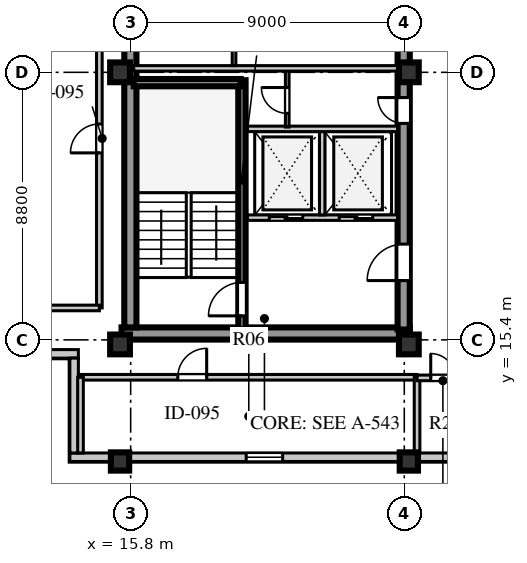
"""IFC4 building model, lengths in metres.
Left out: names, types, materials, properties, quantities, classifications, styles, units other than length and angle.
Written with IfcOpenShell. Run it as: python <this file> out.ifc"""

import sys

from ifc_helpers import new_model, si_unit, direction, frame, frame_2d, origin, origin_2d, place, context, subcontext, project, spatial, rectangle, extrude, element, fill, save


model = new_model("IFC4")
c1 = context("Model", 3, precision=1e-05, world=origin(), true_north=direction((0.0, 1.0)))
c2 = subcontext(c1, "Body", "Model", "MODEL_VIEW")
j1 = project(units=[si_unit("LENGTHUNIT", "METRE"), si_unit("PLANEANGLEUNIT", "RADIAN")], contexts=[c1])
p1 = place(None, origin())
s1 = spatial("IfcSite", under=j1, at=p1, CompositionType="ELEMENT")
p2 = place(p1, origin())
s2 = spatial("IfcBuilding", under=s1, at=p2, CompositionType="ELEMENT")
p3 = place(p2, frame((0.0, 0.0, 335.3)))
s3 = spatial("IfcBuildingStorey", under=s2, at=p3, CompositionType="ELEMENT", Elevation=335.3)
p4 = place(p3, frame((15.5, 15.61, 0.0), z_axis=(0.0, 0.0, 1.0), x_axis=(1.0, 0.0, 0.0)))
e1 = element("IfcWall", 1, at=p4, inside=s3, PredefinedType="SHEAR", context=c2, shape_type="SweptSolid", body=[
    extrude(rectangle(XDim=9.48, YDim=0.4, at=frame_2d((4.74, 0.0))), origin(), (0.0, 0.0, 1.0), 3.56),
])
p5 = place(p3, frame((15.79, 15.81, 0.0), z_axis=(0.0, 0.0, 1.0), x_axis=(0.0, 1.0, 0.0)))
e2 = element("IfcWall", 2, at=p5, inside=s3, PredefinedType="SHEAR", context=c2, shape_type="SweptSolid", body=[
    extrude(rectangle(XDim=25.63, YDim=0.4, at=frame_2d((12.815, 0.0))), origin(), (0.0, 0.0, 1.0), 3.56),
])
p6 = place(p3, frame((24.78, 15.74, 0.0), z_axis=(0.0, 0.0, 1.0), x_axis=(0.0, 1.0, 0.0)))
e3 = element("IfcWall", 3, at=p6, inside=s3, PredefinedType="SHEAR", context=c2, shape_type="SweptSolid", body=[
    extrude(rectangle(XDim=25.76, YDim=0.4, at=frame_2d((12.88, 0.0))), origin(), (0.0, 0.0, 1.0), 3.56),
])
p7 = place(p6, frame((1.61, 0.0, 0.0)))
e4 = element("IfcOpeningElement", 4, at=p7, cuts=e3, PredefinedType="OPENING", context=c2, shape_type="SweptSolid", body=[
    extrude(rectangle(XDim=1.2, YDim=2.1, at=frame_2d((0.6, 1.05))), frame((0.0, 0.21, 0.0), z_axis=(0.0, -1.0, 0.0), x_axis=(1.0, 0.0, 0.0)), (0.0, 0.0, 1.0), 0.42),
])
p8 = place(p6, frame((6.78, 0.0, 0.0)))
e5 = element("IfcOpeningElement", 5, at=p8, cuts=e3, PredefinedType="OPENING", context=c2, shape_type="SweptSolid", body=[
    extrude(rectangle(XDim=0.85, YDim=2.06, at=frame_2d((0.425, 1.03))), frame((0.0, 0.21, 0.0), z_axis=(0.0, -1.0, 0.0), x_axis=(1.0, 0.0, 0.0)), (0.0, 0.0, 1.0), 0.42),
])
p9 = place(p6, frame((12.11, 0.0, 0.0)))
e6 = element("IfcOpeningElement", 6, at=p9, cuts=e3, PredefinedType="OPENING", context=c2, shape_type="SweptSolid", body=[
    extrude(rectangle(XDim=1.5, YDim=2.12, at=frame_2d((0.75, 1.06))), frame((0.0, 0.21, 0.0), z_axis=(0.0, -1.0, 0.0), x_axis=(1.0, 0.0, 0.0)), (0.0, 0.0, 1.0), 0.42),
])
p10 = place(p6, frame((20.11, 0.0, 0.0)))
e7 = element("IfcOpeningElement", 7, at=p10, cuts=e3, PredefinedType="OPENING", context=c2, shape_type="SweptSolid", body=[
    extrude(rectangle(XDim=1.2, YDim=2.12, at=frame_2d((0.6, 1.06))), frame((0.0, 0.21, 0.0), z_axis=(0.0, -1.0, 0.0), x_axis=(1.0, 0.0, 0.0)), (0.0, 0.0, 1.0), 0.42),
])
p11 = place(p6, frame((24.01, 0.0, 0.0)))
e8 = element("IfcOpeningElement", 8, at=p11, cuts=e3, PredefinedType="OPENING", context=c2, shape_type="SweptSolid", body=[
    extrude(rectangle(XDim=0.95, YDim=2.1, at=frame_2d((0.475, 1.05))), frame((0.0, 0.21, 0.0), z_axis=(0.0, -1.0, 0.0), x_axis=(1.0, 0.0, 0.0)), (0.0, 0.0, 1.0), 0.42),
])
for number, where, z_axis, x_axis in (
    (9, (15.45, 15.25, 0.0), (0.0, 0.0, 1.0), (1.0, 0.0, 0.0)),
    (10, (15.45, 24.2, 0.0), (0.0, 0.0, 1.0), (1.0, 0.0, 0.0)),
    (11, (24.95, 15.25, 0.0), (0.0, 0.0, 1.0), (1.0, 0.0, 0.0)),
    (12, (24.95, 24.2, 0.0), (0.0, 0.0, 1.0), (1.0, 0.0, 0.0)),
):
    element("IfcColumn", number, at=place(p3, frame(where, z_axis=z_axis, x_axis=x_axis)), inside=s3, PredefinedType="COLUMN", context=c2, shape_type="SweptSolid", body=[
        extrude(rectangle(XDim=0.65, YDim=0.65, at=origin_2d()), origin(), (0.0, 0.0, 1.0), 3.56),
    ])
for number, where, z_axis, x_axis in (
    (13, (15.45, 11.4, 0.0), (0.0, 0.0, 1.0), (1.0, 0.0, 0.0)),
    (14, (24.95, 11.4, 0.0), (0.0, 0.0, 1.0), (1.0, 0.0, 0.0)),
):
    element("IfcColumn", number, at=place(p3, frame(where, z_axis=z_axis, x_axis=x_axis)), inside=s3, PredefinedType="COLUMN", context=c2, shape_type="SweptSolid", body=[
        extrude(rectangle(XDim=0.6, YDim=0.6, at=origin_2d()), origin(), (0.0, 0.0, 1.0), 3.56),
    ])
p12 = place(p3, frame((13.8, 11.54, 0.0), z_axis=(0.0, 0.0, 1.0), x_axis=(1.0, 0.0, 0.0)))
e15 = element("IfcWall", 15, at=p12, inside=s3, PredefinedType="STANDARD", context=c2, shape_type="SweptSolid", body=[
    extrude(rectangle(XDim=26.0, YDim=0.28, at=frame_2d((13.0, 0.0))), origin(), (0.0, 0.0, 1.0), 2.92),
])
p13 = place(p12, frame((5.8, 0.0, 0.8)))
e16 = element("IfcOpeningElement", 16, at=p13, cuts=e15, PredefinedType="OPENING", context=c2, shape_type="SweptSolid", body=[
    extrude(rectangle(XDim=1.2, YDim=1.75, at=frame_2d((0.6, 0.875))), frame((0.0, 0.15, 0.0), z_axis=(0.0, -1.0, 0.0), x_axis=(1.0, 0.0, 0.0)), (0.0, 0.0, 1.0), 0.3),
])
p14 = place(p12, frame((14.18, 0.0, 0.8)))
e17 = element("IfcOpeningElement", 17, at=p14, cuts=e15, PredefinedType="OPENING", context=c2, shape_type="SweptSolid", body=[
    extrude(rectangle(XDim=1.2, YDim=1.75, at=frame_2d((0.6, 0.875))), frame((0.0, 0.15, 0.0), z_axis=(0.0, -1.0, 0.0), x_axis=(1.0, 0.0, 0.0)), (0.0, 0.0, 1.0), 0.3),
])
p15 = place(p12, frame((17.09, 0.0, 0.8)))
e18 = element("IfcOpeningElement", 18, at=p15, cuts=e15, PredefinedType="OPENING", context=c2, shape_type="SweptSolid", body=[
    extrude(rectangle(XDim=2.1, YDim=1.95, at=frame_2d((1.05, 0.975))), frame((0.0, 0.15, 0.0), z_axis=(0.0, -1.0, 0.0), x_axis=(1.0, 0.0, 0.0)), (0.0, 0.0, 1.0), 0.3),
])
p16 = place(p12, frame((22.39, 0.0, 0.8)))
e19 = element("IfcOpeningElement", 19, at=p16, cuts=e15, PredefinedType="OPENING", context=c2, shape_type="SweptSolid", body=[
    extrude(rectangle(XDim=1.35, YDim=1.9, at=frame_2d((0.675, 0.95))), frame((0.0, 0.15, 0.0), z_axis=(0.0, -1.0, 0.0), x_axis=(1.0, 0.0, 0.0)), (0.0, 0.0, 1.0), 0.3),
])
p17 = place(p3, frame((10.4, 14.94, 0.0), z_axis=(0.0, 0.0, 1.0), x_axis=(1.0, 0.0, 0.0)))
e20 = element("IfcWall", 20, at=p17, inside=s3, PredefinedType="STANDARD", context=c2, shape_type="SweptSolid", body=[
    extrude(rectangle(XDim=3.68, YDim=0.28, at=frame_2d((1.84, 0.0))), origin(), (0.0, 0.0, 1.0), 2.92),
])
p18 = place(p3, frame((13.94, 14.8, 0.0), z_axis=(0.0, 0.0, 1.0), x_axis=(0.0, -1.0, 0.0)))
e21 = element("IfcWall", 21, at=p18, inside=s3, PredefinedType="STANDARD", context=c2, shape_type="SweptSolid", body=[
    extrude(rectangle(XDim=3.12, YDim=0.28, at=frame_2d((1.56, 0.0))), origin(), (0.0, 0.0, 1.0), 2.92),
])
p19 = place(p3, frame((19.46, 15.74, 0.0), z_axis=(0.0, 0.0, 1.0), x_axis=(0.0, 1.0, 0.0)))
e22 = element("IfcWall", 22, at=p19, inside=s3, PredefinedType="SHEAR", context=c2, shape_type="SweptSolid", body=[
    extrude(rectangle(XDim=8.2, YDim=0.24, at=frame_2d((4.1, 0.0))), origin(), (0.0, 0.0, 1.0), 3.8),
])
p20 = place(p19, frame((0.45, 0.0, 0.0)))
e23 = element("IfcOpeningElement", 23, at=p20, cuts=e22, PredefinedType="OPENING", context=c2, shape_type="SweptSolid", body=[
    extrude(rectangle(XDim=1.1, YDim=2.1, at=frame_2d((0.55, 1.05))), frame((0.0, 0.13, 0.0), z_axis=(0.0, -1.0, 0.0), x_axis=(1.0, 0.0, 0.0)), (0.0, 0.0, 1.0), 0.26),
])
p21 = place(p3, frame((15.9, 23.86, 0.0), z_axis=(0.0, 0.0, 1.0), x_axis=(1.0, 0.0, 0.0)))
e24 = element("IfcWall", 24, at=p21, inside=s3, PredefinedType="SHEAR", context=c2, shape_type="SweptSolid", body=[
    extrude(rectangle(XDim=3.52, YDim=0.24, at=frame_2d((1.76, 0.0))), origin(), (0.0, 0.0, 1.0), 3.8),
])
p22 = place(p3, frame((19.64, 19.42, 0.0), z_axis=(0.0, 0.0, 1.0), x_axis=(1.0, 0.0, 0.0)))
e25 = element("IfcWall", 25, at=p22, inside=s3, PredefinedType="SOLIDWALL", context=c2, shape_type="SweptSolid", body=[
    extrude(rectangle(XDim=4.94, YDim=0.18, at=frame_2d((2.47, 0.0))), origin(), (0.0, 0.0, 1.0), 3.56),
])
p23 = place(p22, frame((0.72, 0.0, 0.0)))
e26 = element("IfcOpeningElement", 26, at=p23, cuts=e25, PredefinedType="OPENING", context=c2, shape_type="SweptSolid", body=[
    extrude(rectangle(XDim=1.1, YDim=2.1, at=frame_2d((0.55, 1.05))), frame((0.0, 0.1, 0.0), z_axis=(0.0, -1.0, 0.0), x_axis=(1.0, 0.0, 0.0)), (0.0, 0.0, 1.0), 0.2),
])
p24 = place(p22, frame((3.02, 0.0, 0.0)))
e27 = element("IfcOpeningElement", 27, at=p24, cuts=e25, PredefinedType="OPENING", context=c2, shape_type="SweptSolid", body=[
    extrude(rectangle(XDim=1.1, YDim=2.1, at=frame_2d((0.55, 1.05))), frame((0.0, 0.1, 0.0), z_axis=(0.0, -1.0, 0.0), x_axis=(1.0, 0.0, 0.0)), (0.0, 0.0, 1.0), 0.2),
])
p25 = place(p3, frame((22.1, 19.51, 0.0), z_axis=(0.0, 0.0, 1.0), x_axis=(0.0, 1.0, 0.0)))
e28 = element("IfcWall", 28, at=p25, inside=s3, PredefinedType="SOLIDWALL", context=c2, shape_type="SweptSolid", body=[
    extrude(rectangle(XDim=2.74, YDim=0.18, at=frame_2d((1.37, 0.0))), origin(), (0.0, 0.0, 1.0), 3.56),
])
p26 = place(p3, frame((19.64, 22.34, 0.0), z_axis=(0.0, 0.0, 1.0), x_axis=(1.0, 0.0, 0.0)))
e29 = element("IfcWall", 29, at=p26, inside=s3, PredefinedType="SOLIDWALL", context=c2, shape_type="SweptSolid", body=[
    extrude(rectangle(XDim=4.94, YDim=0.18, at=frame_2d((2.47, 0.0))), origin(), (0.0, 0.0, 1.0), 3.56),
])
p27 = place(p3, frame((20.95, 22.4, 0.0), z_axis=(0.0, 0.0, 1.0), x_axis=(0.0, 1.0, 0.0)))
e30 = element("IfcWall", 30, at=p27, inside=s3, PredefinedType="PARTITIONING", context=c2, shape_type="SweptSolid", body=[
    extrude(rectangle(XDim=1.88, YDim=0.12, at=frame_2d((0.94, 0.0))), origin(), (0.0, 0.0, 1.0), 3.56),
])
p28 = place(p27, frame((0.45, 0.0, 0.0)))
e31 = element("IfcOpeningElement", 31, at=p28, cuts=e30, PredefinedType="OPENING", context=c2, shape_type="SweptSolid", body=[
    extrude(rectangle(XDim=0.85, YDim=2.06, at=frame_2d((0.425, 1.03))), frame((0.0, 0.07, 0.0), z_axis=(0.0, -1.0, 0.0), x_axis=(1.0, 0.0, 0.0)), (0.0, 0.0, 1.0), 0.14),
])
p29 = place(p3, frame((15.9, 24.33, 0.0), z_axis=(0.0, 0.0, 1.0), x_axis=(1.0, 0.0, 0.0)))
e32 = element("IfcWall", 32, at=p29, inside=s3, PredefinedType="SOLIDWALL", context=c2, shape_type="SweptSolid", body=[
    extrude(rectangle(XDim=8.68, YDim=0.18, at=frame_2d((4.34, 0.0))), origin(), (0.0, 0.0, 1.0), 2.96),
])
p30 = place(p3, frame((19.2, 24.42, 0.0), z_axis=(0.0, 0.0, 1.0), x_axis=(0.0, 1.0, 0.0)))
e33 = element("IfcWall", 33, at=p30, inside=s3, PredefinedType="PARTITIONING", context=c2, shape_type="SweptSolid", body=[
    extrude(rectangle(XDim=2.02, YDim=0.12, at=frame_2d((1.01, 0.0))), origin(), (0.0, 0.0, 1.0), 3.56),
])
p31 = place(p3, frame((14.15, 14.17, 0.0), z_axis=(0.0, 0.0, 1.0), x_axis=(1.0, 0.0, 0.0)))
e34 = element("IfcWall", 34, at=p31, inside=s3, PredefinedType="SOLIDWALL", context=c2, shape_type="SweptSolid", body=[
    extrude(rectangle(XDim=11.07, YDim=0.185, at=frame_2d((5.535, 0.0))), origin(), (0.0, 0.0, 1.0), 3.56),
])
p32 = place(p31, frame((3.2, 0.0, 0.0)))
e35 = element("IfcOpeningElement", 35, at=p32, cuts=e34, PredefinedType="OPENING", context=c2, shape_type="SweptSolid", body=[
    extrude(rectangle(XDim=0.95, YDim=2.08, at=frame_2d((0.475, 1.04))), frame((0.0, 0.103, 0.0), z_axis=(0.0, -1.0, 0.0), x_axis=(1.0, 0.0, 0.0)), (0.0, 0.0, 1.0), 0.205),
])
p33 = place(p3, frame((14.15, 11.68, 0.0), z_axis=(0.0, 0.0, 1.0), x_axis=(0.0, 1.0, 0.0)))
e36 = element("IfcWall", 36, at=p33, inside=s3, PredefinedType="SOLIDWALL", context=c2, shape_type="SweptSolid", body=[
    extrude(rectangle(XDim=2.49, YDim=0.185, at=frame_2d((1.245, 0.0))), origin(), (0.0, 0.0, 1.0), 3.56),
])
p34 = place(p3, frame((25.22, 11.68, 0.0), z_axis=(0.0, 0.0, 1.0), x_axis=(0.0, 1.0, 0.0)))
e37 = element("IfcWall", 37, at=p34, inside=s3, PredefinedType="SOLIDWALL", context=c2, shape_type="SweptSolid", body=[
    extrude(rectangle(XDim=2.49, YDim=0.185, at=frame_2d((1.245, 0.0))), origin(), (0.0, 0.0, 1.0), 3.11),
])
p35 = place(p3, frame((14.77, 16.45, 0.0), z_axis=(0.0, 0.0, 1.0), x_axis=(0.0, 1.0, 0.0)))
e38 = element("IfcWall", 38, at=p35, inside=s3, PredefinedType="SOLIDWALL", context=c2, shape_type="SweptSolid", body=[
    extrude(rectangle(XDim=24.3, YDim=0.185, at=frame_2d((12.15, 0.0))), origin(), (0.0, 0.0, 1.0), 3.56),
])
p36 = place(p35, frame((5.1, 0.0, 0.0)))
e39 = element("IfcOpeningElement", 39, at=p36, cuts=e38, PredefinedType="OPENING", context=c2, shape_type="SweptSolid", body=[
    extrude(rectangle(XDim=0.95, YDim=2.08, at=frame_2d((0.475, 1.04))), frame((0.0, 0.103, 0.0), z_axis=(0.0, -1.0, 0.0), x_axis=(1.0, 0.0, 0.0)), (0.0, 0.0, 1.0), 0.205),
])
p37 = place(p3, frame((10.68, 16.45, 0.0), z_axis=(0.0, 0.0, 1.0), x_axis=(1.0, 0.0, 0.0)))
e40 = element("IfcWall", 40, at=p37, inside=s3, PredefinedType="SOLIDWALL", context=c2, shape_type="SweptSolid", body=[
    extrude(rectangle(XDim=4.09, YDim=0.185, at=frame_2d((2.045, 0.0))), origin(), (0.0, 0.0, 1.0), 3.56),
])
p38 = place(p3, frame((25.22, 14.15, 0.0), z_axis=(0.0, 0.0, 1.0), x_axis=(1.0, 0.0, 0.0)))
e41 = element("IfcWall", 41, at=p38, inside=s3, PredefinedType="SOLIDWALL", context=c2, shape_type="SweptSolid", body=[
    extrude(rectangle(XDim=1.86, YDim=0.185, at=frame_2d((0.93, 0.0))), origin(), (0.0, 0.0, 1.0), 3.56),
])
p39 = place(p38, frame((0.45, 0.0, 0.0)))
e42 = element("IfcOpeningElement", 42, at=p39, cuts=e41, PredefinedType="OPENING", context=c2, shape_type="SweptSolid", body=[
    extrude(rectangle(XDim=0.8, YDim=2.05, at=frame_2d((0.4, 1.025))), frame((0.0, 0.103, 0.0), z_axis=(0.0, -1.0, 0.0), x_axis=(1.0, 0.0, 0.0)), (0.0, 0.0, 1.0), 0.205),
])
p40 = place(p13, origin())
e43 = element("IfcWindow", 43, at=p40, inside=s3, PartitioningType="SINGLE_PANEL", PredefinedType="WINDOW", context=c2, shape_type="SweptSolid", body=[
    extrude(rectangle(XDim=1.2, YDim=1.75, at=frame_2d((0.6, 0.875))), frame((0.0, 0.03, 0.0), z_axis=(0.0, -1.0, 0.0), x_axis=(1.0, 0.0, 0.0)), (0.0, 0.0, 1.0), 0.06),
])
fill(e16, e43)
p41 = place(p20, origin())
e44 = element("IfcDoor", 44, at=p41, inside=s3, OperationType="SINGLE_SWING_LEFT", PredefinedType="DOOR", context=c2, shape_type="SweptSolid", body=[
    extrude(rectangle(XDim=1.1, YDim=2.1, at=frame_2d((0.55, 1.05))), frame((0.0, 0.025, 0.0), z_axis=(0.0, -1.0, 0.0), x_axis=(1.0, 0.0, 0.0)), (0.0, 0.0, 1.0), 0.05),
])
fill(e23, e44)
p42 = place(p23, origin())
e45 = element("IfcDoor", 45, at=p42, inside=s3, OperationType="DOUBLE_DOOR_SLIDING", PredefinedType="DOOR", context=c2, shape_type="SweptSolid", body=[
    extrude(rectangle(XDim=1.1, YDim=2.1, at=frame_2d((0.55, 1.05))), frame((0.0, 0.025, 0.0), z_axis=(0.0, -1.0, 0.0), x_axis=(1.0, 0.0, 0.0)), (0.0, 0.0, 1.0), 0.05),
])
fill(e26, e45)
p43 = place(p24, origin())
e46 = element("IfcDoor", 46, at=p43, inside=s3, OperationType="DOUBLE_DOOR_SLIDING", PredefinedType="DOOR", context=c2, shape_type="SweptSolid", body=[
    extrude(rectangle(XDim=1.1, YDim=2.1, at=frame_2d((0.55, 1.05))), frame((0.0, 0.025, 0.0), z_axis=(0.0, -1.0, 0.0), x_axis=(1.0, 0.0, 0.0)), (0.0, 0.0, 1.0), 0.05),
])
fill(e27, e46)
p44 = place(p7, frame((1.2, 0.0, 0.0), z_axis=(0.0, 0.0, 1.0), x_axis=(-1.0, 0.0, 0.0)))
e47 = element("IfcDoor", 47, at=p44, inside=s3, OperationType="SINGLE_SWING_RIGHT", PredefinedType="DOOR", context=c2, shape_type="SweptSolid", body=[
    extrude(rectangle(XDim=1.2, YDim=2.1, at=frame_2d((0.6, 1.05))), frame((0.0, 0.025, 0.0), z_axis=(0.0, -1.0, 0.0), x_axis=(1.0, 0.0, 0.0)), (0.0, 0.0, 1.0), 0.05),
])
fill(e4, e47)
p45 = place(p28, origin())
e48 = element("IfcDoor", 48, at=p45, inside=s3, OperationType="SINGLE_SWING_RIGHT", PredefinedType="DOOR", context=c2, shape_type="SweptSolid", body=[
    extrude(rectangle(XDim=0.85, YDim=2.06, at=frame_2d((0.425, 1.03))), frame((0.0, 0.025, 0.0), z_axis=(0.0, -1.0, 0.0), x_axis=(1.0, 0.0, 0.0)), (0.0, 0.0, 1.0), 0.05),
])
fill(e31, e48)
p46 = place(p8, frame((0.85, 0.0, 0.0), z_axis=(0.0, 0.0, 1.0), x_axis=(-1.0, 0.0, 0.0)))
e49 = element("IfcDoor", 49, at=p46, inside=s3, OperationType="SINGLE_SWING_LEFT", PredefinedType="DOOR", context=c2, shape_type="SweptSolid", body=[
    extrude(rectangle(XDim=0.85, YDim=2.06, at=frame_2d((0.425, 1.03))), frame((0.0, 0.025, 0.0), z_axis=(0.0, -1.0, 0.0), x_axis=(1.0, 0.0, 0.0)), (0.0, 0.0, 1.0), 0.05),
])
fill(e5, e49)
p47 = place(p32, frame((0.95, 0.0, 0.0), z_axis=(0.0, 0.0, 1.0), x_axis=(-1.0, 0.0, 0.0)))
e50 = element("IfcDoor", 50, at=p47, inside=s3, OperationType="SINGLE_SWING_LEFT", PredefinedType="DOOR", context=c2, shape_type="SweptSolid", body=[
    extrude(rectangle(XDim=0.95, YDim=2.08, at=frame_2d((0.475, 1.04))), frame((0.0, 0.025, 0.0), z_axis=(0.0, -1.0, 0.0), x_axis=(1.0, 0.0, 0.0)), (0.0, 0.0, 1.0), 0.05),
])
fill(e35, e50)
p48 = place(p36, origin())
e51 = element("IfcDoor", 51, at=p48, inside=s3, OperationType="SINGLE_SWING_LEFT", PredefinedType="DOOR", context=c2, shape_type="SweptSolid", body=[
    extrude(rectangle(XDim=0.95, YDim=2.08, at=frame_2d((0.475, 1.04))), frame((0.0, 0.025, 0.0), z_axis=(0.0, -1.0, 0.0), x_axis=(1.0, 0.0, 0.0)), (0.0, 0.0, 1.0), 0.05),
])
fill(e39, e51)
p49 = place(p39, origin())
e52 = element("IfcDoor", 52, at=p49, inside=s3, OperationType="SINGLE_SWING_LEFT", PredefinedType="DOOR", context=c2, shape_type="SweptSolid", body=[
    extrude(rectangle(XDim=0.8, YDim=2.05, at=frame_2d((0.4, 1.025))), frame((0.0, 0.025, 0.0), z_axis=(0.0, -1.0, 0.0), x_axis=(1.0, 0.0, 0.0)), (0.0, 0.0, 1.0), 0.05),
])
fill(e42, e52)
save(model, sys.argv[1])
